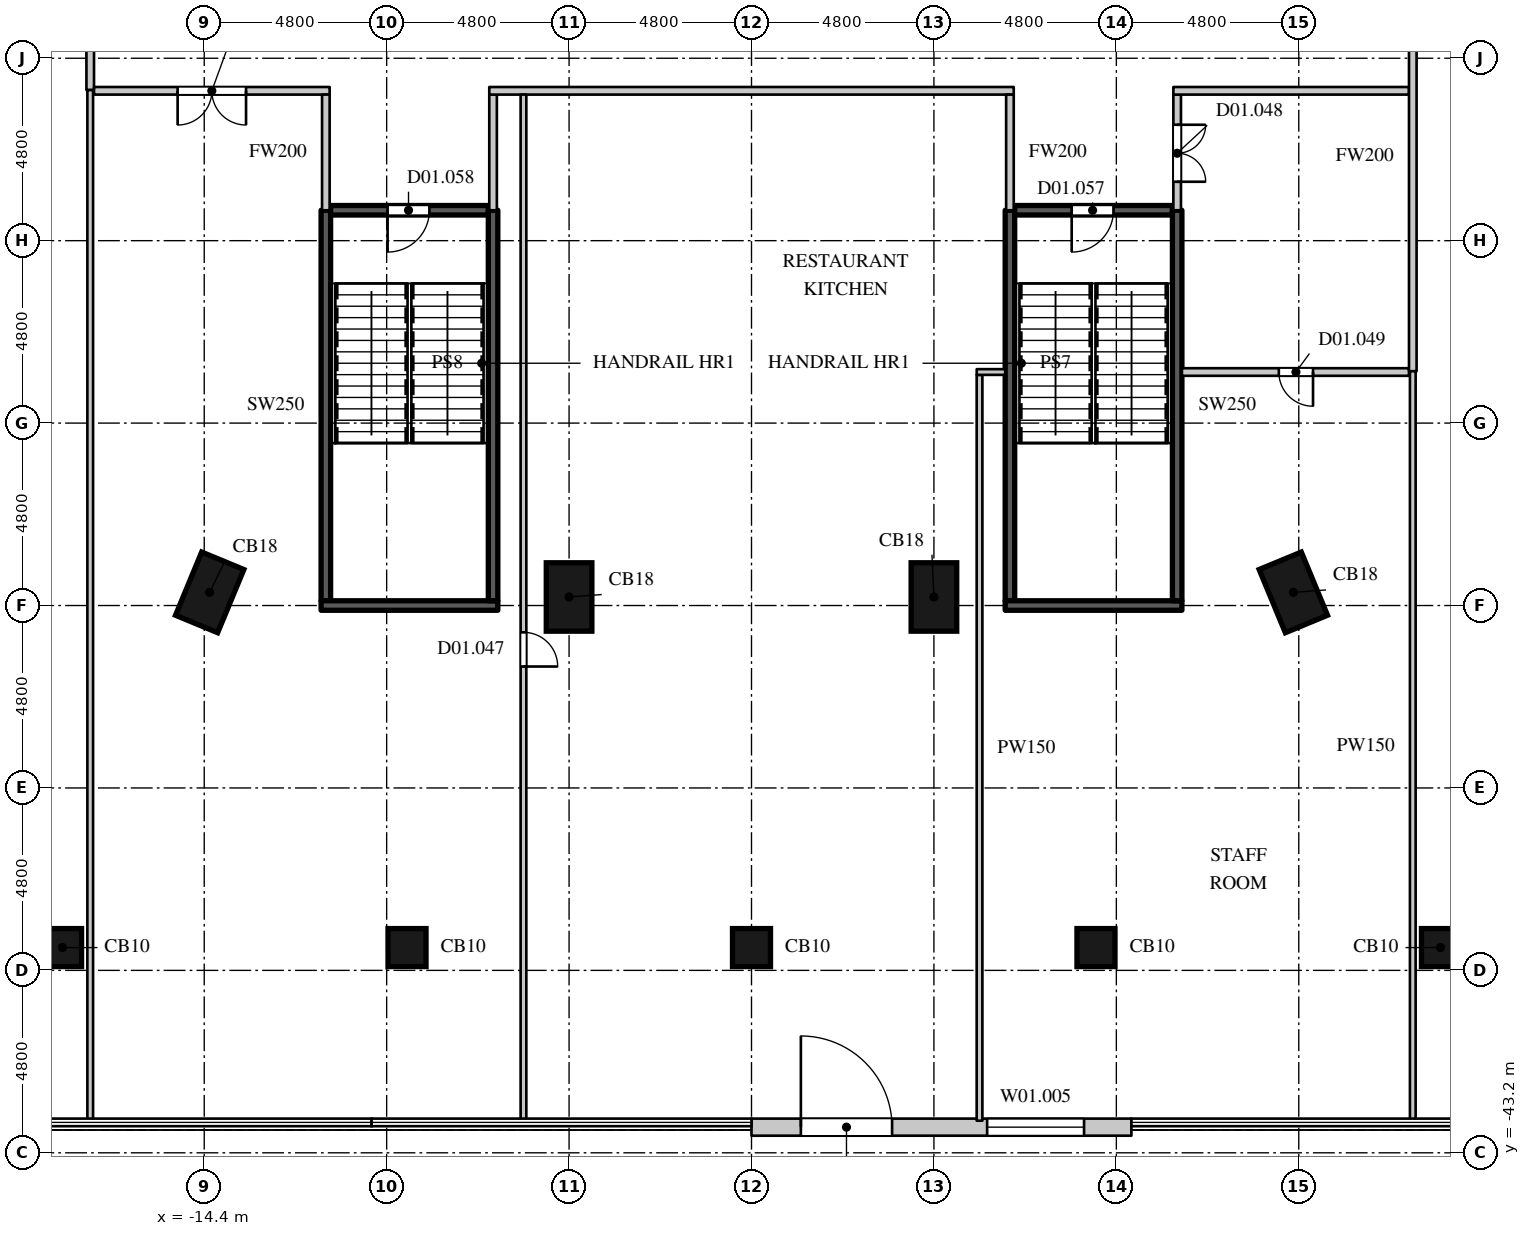
"""IFC4 building model, lengths in metres.
Left out: names, types, materials, properties, quantities, classifications, styles, units other than length and angle.
Written with IfcOpenShell. Run it as: python <this file> out.ifc"""

import sys

from ifc_helpers import new_model, si_unit, direction, frame, frame_2d, origin, origin_2d, place, context, subcontext, project, spatial, rectangle, extrude, element, fill, save


model = new_model("IFC4")
c1 = context("Model", 3, precision=1e-05, world=origin(), true_north=direction((0.0, 1.0)))
c2 = subcontext(c1, "Body", "Model", "MODEL_VIEW")
j1 = project(units=[si_unit("LENGTHUNIT", "METRE"), si_unit("PLANEANGLEUNIT", "RADIAN")], contexts=[c1])
p1 = place(None, origin())
s1 = spatial("IfcSite", under=j1, at=p1, CompositionType="ELEMENT")
p2 = place(p1, origin())
s2 = spatial("IfcBuilding", under=s1, at=p2, CompositionType="ELEMENT")
p3 = place(p2, frame((0.0, 0.0, 6.0)))
s3 = spatial("IfcBuildingStorey", under=s2, at=p3, CompositionType="ELEMENT", Elevation=6.0)
for number, where, z_axis, x_axis in (
    (1, (-18.128, -37.8, 0.0), (0.0, 0.0, 1.0), (1.0, 0.0, 0.0)),
    (2, (-9.064, -37.8, 0.0), (0.0, 0.0, 1.0), (1.0, 0.0, 0.0)),
    (3, (0.0, -37.8, 0.0), (0.0, 0.0, 1.0), (1.0, 0.0, 0.0)),
    (4, (9.064, -37.8, 0.0), (0.0, 0.0, 1.0), (1.0, 0.0, 0.0)),
    (5, (18.128, -37.8, 0.0), (0.0, 0.0, 1.0), (1.0, 0.0, 0.0)),
):
    element("IfcColumn", number, at=place(p3, frame(where, z_axis=z_axis, x_axis=x_axis)), inside=s3, PredefinedType="COLUMN", context=c2, shape_type="SweptSolid", body=[
        extrude(rectangle(XDim=1.0, YDim=1.0, at=origin_2d()), origin(), (0.0, 0.0, 1.0), 5.0),
    ])
for number, where, z_axis, x_axis in (
    (6, (-4.8, -28.575, 0.0), (0.0, 0.0, 1.0), (1.0, 0.0, 0.0)),
    (7, (4.8, -28.575, 0.0), (0.0, 0.0, 1.0), (1.0, 0.0, 0.0)),
    (8, (-14.257, -28.454, 0.0), (0.0, 0.0, 1.0), (0.924, -0.383, 0.0)),
    (9, (14.257, -28.454, 0.0), (0.0, 0.0, 1.0), (0.924, 0.383, 0.0)),
):
    element("IfcColumn", number, at=place(p3, frame(where, z_axis=z_axis, x_axis=x_axis)), inside=s3, PredefinedType="COLUMN", context=c2, shape_type="SweptSolid", body=[
        extrude(rectangle(XDim=1.2, YDim=1.8, at=origin_2d()), origin(), (0.0, 0.0, 1.0), 5.0),
    ])
p4 = place(p3, frame((0.0, -42.525, 0.0), z_axis=(0.0, 0.0, 1.0), x_axis=(1.0, 0.0, 0.0)))
e10 = element("IfcWall", 10, at=p4, inside=s3, PredefinedType="ELEMENTEDWALL", context=c2, shape_type="SweptSolid", body=[
    extrude(rectangle(XDim=9.996, YDim=0.45, at=frame_2d((4.998, 0.0))), origin(), (0.0, 0.0, 1.0), 4.7),
])
p5 = place(p4, frame((1.299, 0.0, 0.0)))
e11 = element("IfcOpeningElement", 11, at=p5, cuts=e10, PredefinedType="OPENING", context=c2, shape_type="SweptSolid", body=[
    extrude(rectangle(XDim=2.4, YDim=2.7, at=frame_2d((1.2, 1.35))), frame((0.0, 0.235, 0.0), z_axis=(0.0, -1.0, 0.0), x_axis=(1.0, 0.0, 0.0)), (0.0, 0.0, 1.0), 0.47),
])
p6 = place(p4, frame((6.2, 0.0, 1.05)))
e12 = element("IfcOpeningElement", 12, at=p6, cuts=e10, PredefinedType="OPENING", context=c2, shape_type="SweptSolid", body=[
    extrude(rectangle(XDim=2.55, YDim=2.7, at=frame_2d((1.275, 1.35))), frame((0.0, 0.235, 0.0), z_axis=(0.0, -1.0, 0.0), x_axis=(1.0, 0.0, 0.0)), (0.0, 0.0, 1.0), 0.47),
])
p7 = place(p3, frame((-17.4, -15.237, 0.0), z_axis=(0.0, 0.0, 1.0), x_axis=(0.0, 1.0, 0.0)))
e13 = element("IfcWall", 13, at=p7, inside=s3, PredefinedType="PARTITIONING", context=c2, shape_type="SweptSolid", body=[
    extrude(rectangle(XDim=3.937, YDim=0.2, at=frame_2d((1.968, 0.0))), origin(), (0.0, 0.0, 1.0), 4.4),
])
p8 = place(p3, frame((-17.3, -15.257, 0.0), z_axis=(0.0, 0.0, 1.0), x_axis=(1.0, 0.0, 0.0)))
e14 = element("IfcWall", 14, at=p8, inside=s3, PredefinedType="PARTITIONING", context=c2, shape_type="SweptSolid", body=[
    extrude(rectangle(XDim=6.2, YDim=0.2, at=frame_2d((3.1, 0.0))), origin(), (0.0, 0.0, 1.0), 4.4),
])
p9 = place(p8, frame((2.2, 0.0, 0.0)))
e15 = element("IfcOpeningElement", 15, at=p9, cuts=e14, PredefinedType="OPENING", context=c2, shape_type="SweptSolid", body=[
    extrude(rectangle(XDim=1.8, YDim=2.4, at=frame_2d((0.9, 1.2))), frame((0.0, 0.11, 0.0), z_axis=(0.0, -1.0, 0.0), x_axis=(1.0, 0.0, 0.0)), (0.0, 0.0, 1.0), 0.22),
])
for number, where, z_axis, x_axis in (
    (16, (-11.2, -18.4, 0.0), (0.0, 0.0, 1.0), (0.0, 1.0, 0.0)),
    (17, (-6.8, -18.4, 0.0), (0.0, 0.0, 1.0), (0.0, 1.0, 0.0)),
):
    element("IfcWall", number, at=place(p3, frame(where, z_axis=z_axis, x_axis=x_axis)), inside=s3, PredefinedType="PARTITIONING", context=c2, shape_type="SweptSolid", body=[
        extrude(rectangle(XDim=3.043, YDim=0.2, at=frame_2d((1.521, 0.0))), origin(), (0.0, 0.0, 1.0), 4.4),
    ])
p10 = place(p3, frame((-6.9, -15.257, 0.0), z_axis=(0.0, 0.0, 1.0), x_axis=(1.0, 0.0, 0.0)))
e18 = element("IfcWall", 18, at=p10, inside=s3, PredefinedType="PARTITIONING", context=c2, shape_type="SweptSolid", body=[
    extrude(rectangle(XDim=13.8, YDim=0.2, at=frame_2d((6.9, 0.0))), origin(), (0.0, 0.0, 1.0), 4.4),
])
p11 = place(p3, frame((6.8, -18.4, 0.0), z_axis=(0.0, 0.0, 1.0), x_axis=(0.0, 1.0, 0.0)))
e19 = element("IfcWall", 19, at=p11, inside=s3, PredefinedType="PARTITIONING", context=c2, shape_type="SweptSolid", body=[
    extrude(rectangle(XDim=3.043, YDim=0.2, at=frame_2d((1.521, 0.0))), origin(), (0.0, 0.0, 1.0), 4.4),
])
p12 = place(p3, frame((11.325, -22.656, 0.0), z_axis=(0.0, 0.0, 1.0), x_axis=(1.0, 0.0, 0.0)))
e20 = element("IfcWall", 20, at=p12, inside=s3, PredefinedType="PARTITIONING", context=c2, shape_type="SweptSolid", body=[
    extrude(rectangle(XDim=5.975, YDim=0.2, at=frame_2d((2.988, 0.0))), origin(), (0.0, 0.0, 1.0), 4.4),
])
p13 = place(p12, frame((2.55, 0.0, 0.0)))
e21 = element("IfcOpeningElement", 21, at=p13, cuts=e20, PredefinedType="OPENING", context=c2, shape_type="SweptSolid", body=[
    extrude(rectangle(XDim=0.9, YDim=2.2, at=frame_2d((0.45, 1.1))), frame((0.0, 0.11, 0.0), z_axis=(0.0, -1.0, 0.0), x_axis=(1.0, 0.0, 0.0)), (0.0, 0.0, 1.0), 0.22),
])
p14 = place(p3, frame((11.2, -18.4, 0.0), z_axis=(0.0, 0.0, 1.0), x_axis=(0.0, 1.0, 0.0)))
e22 = element("IfcWall", 22, at=p14, inside=s3, PredefinedType="PARTITIONING", context=c2, shape_type="SweptSolid", body=[
    extrude(rectangle(XDim=3.043, YDim=0.2, at=frame_2d((1.521, 0.0))), origin(), (0.0, 0.0, 1.0), 4.4),
])
p15 = place(p14, frame((0.75, 0.0, 0.0)))
e23 = element("IfcOpeningElement", 23, at=p15, cuts=e22, PredefinedType="OPENING", context=c2, shape_type="SweptSolid", body=[
    extrude(rectangle(XDim=1.5, YDim=2.4, at=frame_2d((0.75, 1.2))), frame((0.0, 0.11, 0.0), z_axis=(0.0, -1.0, 0.0), x_axis=(1.0, 0.0, 0.0)), (0.0, 0.0, 1.0), 0.22),
])
p16 = place(p3, frame((11.1, -15.257, 0.0), z_axis=(0.0, 0.0, 1.0), x_axis=(1.0, 0.0, 0.0)))
e24 = element("IfcWall", 24, at=p16, inside=s3, PredefinedType="PARTITIONING", context=c2, shape_type="SweptSolid", body=[
    extrude(rectangle(XDim=6.2, YDim=0.2, at=frame_2d((3.1, 0.0))), origin(), (0.0, 0.0, 1.0), 4.4),
])
p17 = place(p3, frame((17.4, -22.636, 0.0), z_axis=(0.0, 0.0, 1.0), x_axis=(0.0, 1.0, 0.0)))
e25 = element("IfcWall", 25, at=p17, inside=s3, PredefinedType="PARTITIONING", context=c2, shape_type="SweptSolid", body=[
    extrude(rectangle(XDim=11.336, YDim=0.2, at=frame_2d((5.668, 0.0))), origin(), (0.0, 0.0, 1.0), 4.4),
])
p18 = place(p17, frame((8.5, 0.0, 0.0)))
e26 = element("IfcOpeningElement", 26, at=p18, cuts=e25, PredefinedType="OPENING", context=c2, shape_type="SweptSolid", body=[
    extrude(rectangle(XDim=1.6, YDim=2.4, at=frame_2d((0.8, 1.2))), frame((0.0, 0.11, 0.0), z_axis=(0.0, -1.0, 0.0), x_axis=(1.0, 0.0, 0.0)), (0.0, 0.0, 1.0), 0.22),
])
p19 = place(p3, frame((-17.4, -42.355, 0.0), z_axis=(0.0, 0.0, 1.0), x_axis=(0.0, 1.0, 0.0)))
e27 = element("IfcWall", 27, at=p19, inside=s3, PredefinedType="PARTITIONING", context=c2, shape_type="SweptSolid", body=[
    extrude(rectangle(XDim=27.118, YDim=0.15, at=frame_2d((13.559, 0.0))), origin(), (0.0, 0.0, 1.0), 4.4),
])
p20 = place(p3, frame((-6.0, -42.355, 0.0), z_axis=(0.0, 0.0, 1.0), x_axis=(0.0, 1.0, 0.0)))
e28 = element("IfcWall", 28, at=p20, inside=s3, PredefinedType="PARTITIONING", context=c2, shape_type="SweptSolid", body=[
    extrude(rectangle(XDim=26.998, YDim=0.15, at=frame_2d((13.499, 0.0))), origin(), (0.0, 0.0, 1.0), 4.4),
])
p21 = place(p20, frame((11.95, 0.0, 0.0)))
e29 = element("IfcOpeningElement", 29, at=p21, cuts=e28, PredefinedType="OPENING", context=c2, shape_type="SweptSolid", body=[
    extrude(rectangle(XDim=0.9, YDim=2.2, at=frame_2d((0.45, 1.1))), frame((0.0, 0.085, 0.0), z_axis=(0.0, -1.0, 0.0), x_axis=(1.0, 0.0, 0.0)), (0.0, 0.0, 1.0), 0.17),
])
p22 = place(p3, frame((6.0, -42.355, 0.0), z_axis=(0.0, 0.0, 1.0), x_axis=(0.0, 1.0, 0.0)))
e30 = element("IfcWall", 30, at=p22, inside=s3, PredefinedType="PARTITIONING", context=c2, shape_type="SweptSolid", body=[
    extrude(rectangle(XDim=19.623, YDim=0.15, at=frame_2d((9.812, 0.0))), origin(), (0.0, 0.0, 1.0), 4.4),
])
p23 = place(p3, frame((5.926, -22.656, 0.0), z_axis=(0.0, 0.0, 1.0), x_axis=(1.0, 0.0, 0.0)))
e31 = element("IfcWall", 31, at=p23, inside=s3, PredefinedType="PARTITIONING", context=c2, shape_type="SweptSolid", body=[
    extrude(rectangle(XDim=0.749, YDim=0.15, at=frame_2d((0.375, 0.0))), origin(), (0.0, 0.0, 1.0), 4.4),
])
p24 = place(p3, frame((17.4, -42.355, 0.0), z_axis=(0.0, 0.0, 1.0), x_axis=(0.0, 1.0, 0.0)))
e32 = element("IfcWall", 32, at=p24, inside=s3, PredefinedType="PARTITIONING", context=c2, shape_type="SweptSolid", body=[
    extrude(rectangle(XDim=19.719, YDim=0.15, at=frame_2d((9.86, 0.0))), origin(), (0.0, 0.0, 1.0), 4.4),
])
p25 = place(p3, frame((-11.2, -28.675, 0.0), z_axis=(0.0, 0.0, 1.0), x_axis=(0.0, 1.0, 0.0)))
e33 = element("IfcWall", 33, at=p25, inside=s3, PredefinedType="SHEAR", context=c2, shape_type="SweptSolid", body=[
    extrude(rectangle(XDim=10.275, YDim=0.25, at=frame_2d((5.138, 0.0))), origin(), (0.0, 0.0, 1.0), 4.65),
])
p26 = place(p3, frame((-11.325, -28.8, 0.0), z_axis=(0.0, 0.0, 1.0), x_axis=(1.0, 0.0, 0.0)))
e34 = element("IfcWall", 34, at=p26, inside=s3, PredefinedType="SHEAR", context=c2, shape_type="SweptSolid", body=[
    extrude(rectangle(XDim=4.65, YDim=0.25, at=frame_2d((2.325, 0.0))), origin(), (0.0, 0.0, 1.0), 4.65),
])
p27 = place(p3, frame((-11.075, -18.4, 0.0), z_axis=(0.0, 0.0, 1.0), x_axis=(1.0, 0.0, 0.0)))
e35 = element("IfcWall", 35, at=p27, inside=s3, PredefinedType="SHEAR", context=c2, shape_type="SweptSolid", body=[
    extrude(rectangle(XDim=4.15, YDim=0.25, at=frame_2d((2.075, 0.0))), origin(), (0.0, 0.0, 1.0), 4.65),
])
p28 = place(p27, frame((1.5, 0.0, 0.0)))
e36 = element("IfcOpeningElement", 36, at=p28, cuts=e35, PredefinedType="OPENING", context=c2, shape_type="SweptSolid", body=[
    extrude(rectangle(XDim=1.1, YDim=2.2, at=frame_2d((0.55, 1.1))), frame((0.0, 0.135, 0.0), z_axis=(0.0, -1.0, 0.0), x_axis=(1.0, 0.0, 0.0)), (0.0, 0.0, 1.0), 0.27),
])
for number, where, z_axis, x_axis in (
    (37, (-6.8, -28.675, 0.0), (0.0, 0.0, 1.0), (0.0, 1.0, 0.0)),
    (38, (6.8, -28.675, 0.0), (0.0, 0.0, 1.0), (0.0, 1.0, 0.0)),
):
    element("IfcWall", number, at=place(p3, frame(where, z_axis=z_axis, x_axis=x_axis)), inside=s3, PredefinedType="SHEAR", context=c2, shape_type="SweptSolid", body=[
        extrude(rectangle(XDim=10.275, YDim=0.25, at=frame_2d((5.138, 0.0))), origin(), (0.0, 0.0, 1.0), 4.65),
    ])
p29 = place(p3, frame((6.675, -28.8, 0.0), z_axis=(0.0, 0.0, 1.0), x_axis=(1.0, 0.0, 0.0)))
e39 = element("IfcWall", 39, at=p29, inside=s3, PredefinedType="SHEAR", context=c2, shape_type="SweptSolid", body=[
    extrude(rectangle(XDim=4.65, YDim=0.25, at=frame_2d((2.325, 0.0))), origin(), (0.0, 0.0, 1.0), 4.65),
])
p30 = place(p3, frame((6.925, -18.4, 0.0), z_axis=(0.0, 0.0, 1.0), x_axis=(1.0, 0.0, 0.0)))
e40 = element("IfcWall", 40, at=p30, inside=s3, PredefinedType="SHEAR", context=c2, shape_type="SweptSolid", body=[
    extrude(rectangle(XDim=4.15, YDim=0.25, at=frame_2d((2.075, 0.0))), origin(), (0.0, 0.0, 1.0), 4.65),
])
p31 = place(p30, frame((1.5, 0.0, 0.0)))
e41 = element("IfcOpeningElement", 41, at=p31, cuts=e40, PredefinedType="OPENING", context=c2, shape_type="SweptSolid", body=[
    extrude(rectangle(XDim=1.1, YDim=2.2, at=frame_2d((0.55, 1.1))), frame((0.0, 0.135, 0.0), z_axis=(0.0, -1.0, 0.0), x_axis=(1.0, 0.0, 0.0)), (0.0, 0.0, 1.0), 0.27),
])
p32 = place(p3, frame((11.2, -28.675, 0.0), z_axis=(0.0, 0.0, 1.0), x_axis=(0.0, 1.0, 0.0)))
e42 = element("IfcWall", 42, at=p32, inside=s3, PredefinedType="SHEAR", context=c2, shape_type="SweptSolid", body=[
    extrude(rectangle(XDim=10.275, YDim=0.25, at=frame_2d((5.138, 0.0))), origin(), (0.0, 0.0, 1.0), 4.65),
])
p33 = place(p5, origin())
e43 = element("IfcDoor", 43, at=p33, inside=s3, OperationType="SINGLE_SWING_LEFT", PredefinedType="DOOR", context=c2, shape_type="SweptSolid", body=[
    extrude(rectangle(XDim=2.4, YDim=2.7, at=frame_2d((1.2, 1.35))), frame((0.0, 0.13, 0.0), z_axis=(0.0, -1.0, 0.0), x_axis=(1.0, 0.0, 0.0)), (0.0, 0.0, 1.0), 0.05),
])
fill(e11, e43)
p34 = place(p6, origin())
e44 = element("IfcWindow", 44, at=p34, inside=s3, PartitioningType="SINGLE_PANEL", PredefinedType="WINDOW", context=c2, shape_type="SweptSolid", body=[
    extrude(rectangle(XDim=2.55, YDim=2.7, at=frame_2d((1.275, 1.35))), frame((0.0, 0.135, 0.0), z_axis=(0.0, -1.0, 0.0), x_axis=(1.0, 0.0, 0.0)), (0.0, 0.0, 1.0), 0.06),
])
fill(e12, e44)
p35 = place(p9, origin())
e45 = element("IfcDoor", 45, at=p35, inside=s3, OperationType="DOUBLE_DOOR_SINGLE_SWING", PredefinedType="DOOR", context=c2, shape_type="SweptSolid", body=[
    extrude(rectangle(XDim=1.8, YDim=2.4, at=frame_2d((0.9, 1.2))), frame((0.0, 0.025, 0.0), z_axis=(0.0, -1.0, 0.0), x_axis=(1.0, 0.0, 0.0)), (0.0, 0.0, 1.0), 0.05),
])
fill(e15, e45)
p36 = place(p21, origin())
e46 = element("IfcDoor", 46, at=p36, inside=s3, OperationType="SINGLE_SWING_RIGHT", PredefinedType="DOOR", context=c2, shape_type="SweptSolid", body=[
    extrude(rectangle(XDim=0.9, YDim=2.2, at=frame_2d((0.45, 1.1))), frame((0.0, 0.025, 0.0), z_axis=(0.0, -1.0, 0.0), x_axis=(1.0, 0.0, 0.0)), (0.0, 0.0, 1.0), 0.05),
])
fill(e29, e46)
p37 = place(p15, origin())
e47 = element("IfcDoor", 47, at=p37, inside=s3, OperationType="DOUBLE_DOOR_SINGLE_SWING", PredefinedType="DOOR", context=c2, shape_type="SweptSolid", body=[
    extrude(rectangle(XDim=1.5, YDim=2.4, at=frame_2d((0.75, 1.2))), frame((0.0, 0.025, 0.0), z_axis=(0.0, -1.0, 0.0), x_axis=(1.0, 0.0, 0.0)), (0.0, 0.0, 1.0), 0.05),
])
fill(e23, e47)
p38 = place(p13, origin())
e48 = element("IfcDoor", 48, at=p38, inside=s3, OperationType="SINGLE_SWING_LEFT", PredefinedType="DOOR", context=c2, shape_type="SweptSolid", body=[
    extrude(rectangle(XDim=0.9, YDim=2.2, at=frame_2d((0.45, 1.1))), frame((0.0, 0.025, 0.0), z_axis=(0.0, -1.0, 0.0), x_axis=(1.0, 0.0, 0.0)), (0.0, 0.0, 1.0), 0.05),
])
fill(e21, e48)
p39 = place(p31, origin())
e49 = element("IfcDoor", 49, at=p39, inside=s3, OperationType="SINGLE_SWING_RIGHT", PredefinedType="DOOR", context=c2, shape_type="SweptSolid", body=[
    extrude(rectangle(XDim=1.1, YDim=2.2, at=frame_2d((0.55, 1.1))), frame((0.0, 0.025, 0.0), z_axis=(0.0, -1.0, 0.0), x_axis=(1.0, 0.0, 0.0)), (0.0, 0.0, 1.0), 0.05),
])
fill(e41, e49)
p40 = place(p28, origin())
e50 = element("IfcDoor", 50, at=p40, inside=s3, OperationType="SINGLE_SWING_RIGHT", PredefinedType="DOOR", context=c2, shape_type="SweptSolid", body=[
    extrude(rectangle(XDim=1.1, YDim=2.2, at=frame_2d((0.55, 1.1))), frame((0.0, 0.025, 0.0), z_axis=(0.0, -1.0, 0.0), x_axis=(1.0, 0.0, 0.0)), (0.0, 0.0, 1.0), 0.05),
])
fill(e36, e50)
save(model, sys.argv[1])
